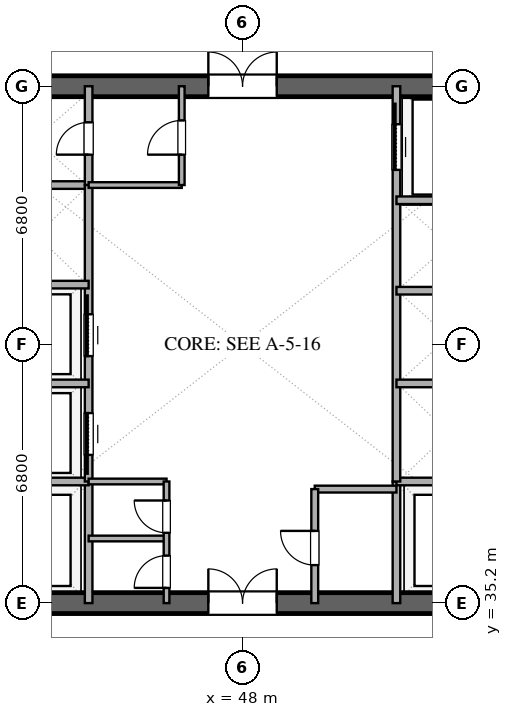
"""IFC4 building model, lengths in metres.
Left out: names, types, materials, properties, quantities, classifications, styles, units other than length and angle.
Written with IfcOpenShell. Run it as: python <this file> out.ifc"""

import sys

from ifc_helpers import new_model, si_unit, direction, frame, frame_2d, origin, place, context, subcontext, project, spatial, rectangle, extrude, element, fill, save


model = new_model("IFC4")
c1 = context("Model", 3, precision=1e-05, world=origin(), true_north=direction((0.0, 1.0)))
c2 = subcontext(c1, "Body", "Model", "MODEL_VIEW")
j1 = project(units=[si_unit("LENGTHUNIT", "METRE"), si_unit("PLANEANGLEUNIT", "RADIAN")], contexts=[c1])
p1 = place(None, origin())
s1 = spatial("IfcSite", under=j1, at=p1, CompositionType="ELEMENT")
p2 = place(p1, origin())
s2 = spatial("IfcBuilding", under=s1, at=p2, CompositionType="ELEMENT")
p3 = place(p2, frame((0.0, 0.0, 87.6)))
s3 = spatial("IfcBuildingStorey", under=s2, at=p3, CompositionType="ELEMENT", Elevation=87.6)
p4 = place(p3, frame((41.0, 35.2, 0.0), z_axis=(0.0, 0.0, 1.0), x_axis=(1.0, 0.0, 0.0)))
e1 = element("IfcWall", 1, at=p4, inside=s3, PredefinedType="SHEAR", context=c2, shape_type="SweptSolid", body=[
    extrude(rectangle(XDim=14.0, YDim=0.55, at=frame_2d((7.0, 0.0))), origin(), (0.0, 0.0, 1.0), 3.38),
])
p5 = place(p4, frame((6.1, 0.0, 0.0)))
e2 = element("IfcOpeningElement", 2, at=p5, cuts=e1, PredefinedType="OPENING", context=c2, shape_type="SweptSolid", body=[
    extrude(rectangle(XDim=1.8, YDim=2.25, at=frame_2d((0.9, 1.125))), frame((0.0, 0.285, 0.0), z_axis=(0.0, -1.0, 0.0), x_axis=(1.0, 0.0, 0.0)), (0.0, 0.0, 1.0), 0.57),
])
p6 = place(p3, frame((41.0, 48.8, 0.0), z_axis=(0.0, 0.0, 1.0), x_axis=(1.0, 0.0, 0.0)))
e3 = element("IfcWall", 3, at=p6, inside=s3, PredefinedType="SHEAR", context=c2, shape_type="SweptSolid", body=[
    extrude(rectangle(XDim=14.0, YDim=0.55, at=frame_2d((7.0, 0.0))), origin(), (0.0, 0.0, 1.0), 3.38),
])
p7 = place(p6, frame((6.1, 0.0, 0.0)))
e4 = element("IfcOpeningElement", 4, at=p7, cuts=e3, PredefinedType="OPENING", context=c2, shape_type="SweptSolid", body=[
    extrude(rectangle(XDim=1.8, YDim=2.25, at=frame_2d((0.9, 1.125))), frame((0.0, 0.285, 0.0), z_axis=(0.0, -1.0, 0.0), x_axis=(1.0, 0.0, 0.0)), (0.0, 0.0, 1.0), 0.57),
])
p8 = place(p3, frame((43.95, 35.2, 0.0), z_axis=(0.0, 0.0, 1.0), x_axis=(0.0, 1.0, 0.0)))
e5 = element("IfcWall", 5, at=p8, inside=s3, PredefinedType="SOLIDWALL", context=c2, shape_type="SweptSolid", body=[
    extrude(rectangle(XDim=3.2, YDim=0.2, at=frame_2d((1.6, 0.0))), origin(), (0.0, 0.0, 1.0), 2.74),
])
p9 = place(p3, frame((41.0, 38.4, 0.0), z_axis=(0.0, 0.0, 1.0), x_axis=(1.0, 0.0, 0.0)))
e6 = element("IfcWall", 6, at=p9, inside=s3, PredefinedType="SOLIDWALL", context=c2, shape_type="SweptSolid", body=[
    extrude(rectangle(XDim=2.95, YDim=0.2, at=frame_2d((1.475, 0.0))), origin(), (0.0, 0.0, 1.0), 2.74),
])
p10 = place(p3, frame((52.05, 35.2, 0.0), z_axis=(0.0, 0.0, 1.0), x_axis=(0.0, 1.0, 0.0)))
e7 = element("IfcWall", 7, at=p10, inside=s3, PredefinedType="SOLIDWALL", context=c2, shape_type="SweptSolid", body=[
    extrude(rectangle(XDim=3.2, YDim=0.2, at=frame_2d((1.6, 0.0))), origin(), (0.0, 0.0, 1.0), 2.74),
])
for number, where, z_axis, x_axis in (
    (8, (52.05, 38.4, 0.0), (0.0, 0.0, 1.0), (1.0, 0.0, 0.0)),
    (9, (41.0, 46.2, 0.0), (0.0, 0.0, 1.0), (1.0, 0.0, 0.0)),
):
    element("IfcWall", number, at=place(p3, frame(where, z_axis=z_axis, x_axis=x_axis)), inside=s3, PredefinedType="SOLIDWALL", context=c2, shape_type="SweptSolid", body=[
        extrude(rectangle(XDim=2.95, YDim=0.2, at=frame_2d((1.475, 0.0))), origin(), (0.0, 0.0, 1.0), 2.74),
    ])
p11 = place(p3, frame((43.95, 46.2, 0.0), z_axis=(0.0, 0.0, 1.0), x_axis=(0.0, 1.0, 0.0)))
e10 = element("IfcWall", 10, at=p11, inside=s3, PredefinedType="SOLIDWALL", context=c2, shape_type="SweptSolid", body=[
    extrude(rectangle(XDim=2.6, YDim=0.2, at=frame_2d((1.3, 0.0))), origin(), (0.0, 0.0, 1.0), 2.74),
])
p12 = place(p11, frame((0.8, 0.0, 0.0)))
e11 = element("IfcOpeningElement", 11, at=p12, cuts=e10, PredefinedType="OPENING", context=c2, shape_type="SweptSolid", body=[
    extrude(rectangle(XDim=0.85, YDim=2.15, at=frame_2d((0.425, 1.075))), frame((0.0, 0.11, 0.0), z_axis=(0.0, -1.0, 0.0), x_axis=(1.0, 0.0, 0.0)), (0.0, 0.0, 1.0), 0.22),
])
p13 = place(p3, frame((43.95, 38.4, 0.0), z_axis=(0.0, 0.0, 1.0), x_axis=(0.0, 1.0, 0.0)))
e12 = element("IfcWall", 12, at=p13, inside=s3, PredefinedType="SOLIDWALL", context=c2, shape_type="SweptSolid", body=[
    extrude(rectangle(XDim=7.8, YDim=0.2, at=frame_2d((3.9, 0.0))), origin(), (0.0, 0.0, 1.0), 2.74),
])
p14 = place(p13, frame((0.7, 0.0, 0.0)))
e13 = element("IfcOpeningElement", 13, at=p14, cuts=e12, PredefinedType="OPENING", context=c2, shape_type="SweptSolid", body=[
    extrude(rectangle(XDim=1.1, YDim=2.2, at=frame_2d((0.55, 1.1))), frame((0.0, 0.11, 0.0), z_axis=(0.0, -1.0, 0.0), x_axis=(1.0, 0.0, 0.0)), (0.0, 0.0, 1.0), 0.22),
])
p15 = place(p13, frame((3.3, 0.0, 0.0)))
e14 = element("IfcOpeningElement", 14, at=p15, cuts=e12, PredefinedType="OPENING", context=c2, shape_type="SweptSolid", body=[
    extrude(rectangle(XDim=1.1, YDim=2.2, at=frame_2d((0.55, 1.1))), frame((0.0, 0.11, 0.0), z_axis=(0.0, -1.0, 0.0), x_axis=(1.0, 0.0, 0.0)), (0.0, 0.0, 1.0), 0.22),
])
for number, where, z_axis, x_axis in (
    (15, (41.0, 40.98, 0.0), (0.0, 0.0, 1.0), (1.0, 0.0, 0.0)),
    (16, (41.0, 43.58, 0.0), (0.0, 0.0, 1.0), (1.0, 0.0, 0.0)),
):
    element("IfcWall", number, at=place(p3, frame(where, z_axis=z_axis, x_axis=x_axis)), inside=s3, PredefinedType="SOLIDWALL", context=c2, shape_type="SweptSolid", body=[
        extrude(rectangle(XDim=2.95, YDim=0.2, at=frame_2d((1.475, 0.0))), origin(), (0.0, 0.0, 1.0), 2.74),
    ])
p16 = place(p3, frame((52.05, 38.4, 0.0), z_axis=(0.0, 0.0, 1.0), x_axis=(0.0, 1.0, 0.0)))
e17 = element("IfcWall", 17, at=p16, inside=s3, PredefinedType="SOLIDWALL", context=c2, shape_type="SweptSolid", body=[
    extrude(rectangle(XDim=10.4, YDim=0.2, at=frame_2d((5.2, 0.0))), origin(), (0.0, 0.0, 1.0), 2.74),
])
p17 = place(p16, frame((8.2, 0.0, 0.0)))
e18 = element("IfcOpeningElement", 18, at=p17, cuts=e17, PredefinedType="OPENING", context=c2, shape_type="SweptSolid", body=[
    extrude(rectangle(XDim=1.2, YDim=2.2, at=frame_2d((0.6, 1.1))), frame((0.0, 0.11, 0.0), z_axis=(0.0, -1.0, 0.0), x_axis=(1.0, 0.0, 0.0)), (0.0, 0.0, 1.0), 0.22),
])
for number, where, z_axis, x_axis in (
    (19, (52.05, 40.98, 0.0), (0.0, 0.0, 1.0), (1.0, 0.0, 0.0)),
    (20, (52.05, 43.42, 0.0), (0.0, 0.0, 1.0), (1.0, 0.0, 0.0)),
    (21, (52.05, 45.8, 0.0), (0.0, 0.0, 1.0), (1.0, 0.0, 0.0)),
):
    element("IfcWall", number, at=place(p3, frame(where, z_axis=z_axis, x_axis=x_axis)), inside=s3, PredefinedType="SOLIDWALL", context=c2, shape_type="SweptSolid", body=[
        extrude(rectangle(XDim=2.95, YDim=0.2, at=frame_2d((1.475, 0.0))), origin(), (0.0, 0.0, 1.0), 2.74),
    ])
for number, where, z_axis, x_axis in (
    (22, (43.95, 36.9, 0.0), (0.0, 0.0, 1.0), (1.0, 0.0, 0.0)),
    (23, (43.95, 38.4, 0.0), (0.0, 0.0, 1.0), (1.0, 0.0, 0.0)),
):
    element("IfcWall", number, at=place(p3, frame(where, z_axis=z_axis, x_axis=x_axis)), inside=s3, PredefinedType="PARTITIONING", context=c2, shape_type="SweptSolid", body=[
        extrude(rectangle(XDim=2.05, YDim=0.15, at=frame_2d((1.025, 0.0))), origin(), (0.0, 0.0, 1.0), 2.74),
    ])
p18 = place(p3, frame((46.0, 35.2, 0.0), z_axis=(0.0, 0.0, 1.0), x_axis=(0.0, 1.0, 0.0)))
e24 = element("IfcWall", 24, at=p18, inside=s3, PredefinedType="PARTITIONING", context=c2, shape_type="SweptSolid", body=[
    extrude(rectangle(XDim=3.2, YDim=0.15, at=frame_2d((1.6, 0.0))), origin(), (0.0, 0.0, 1.0), 2.74),
])
p19 = place(p18, frame((0.4, 0.0, 0.0)))
e25 = element("IfcOpeningElement", 25, at=p19, cuts=e24, PredefinedType="OPENING", context=c2, shape_type="SweptSolid", body=[
    extrude(rectangle(XDim=0.85, YDim=2.15, at=frame_2d((0.425, 1.075))), frame((0.0, 0.085, 0.0), z_axis=(0.0, -1.0, 0.0), x_axis=(1.0, 0.0, 0.0)), (0.0, 0.0, 1.0), 0.17),
])
p20 = place(p18, frame((1.85, 0.0, 0.0)))
e26 = element("IfcOpeningElement", 26, at=p20, cuts=e24, PredefinedType="OPENING", context=c2, shape_type="SweptSolid", body=[
    extrude(rectangle(XDim=0.85, YDim=2.15, at=frame_2d((0.425, 1.075))), frame((0.0, 0.085, 0.0), z_axis=(0.0, -1.0, 0.0), x_axis=(1.0, 0.0, 0.0)), (0.0, 0.0, 1.0), 0.17),
])
p21 = place(p3, frame((43.95, 46.2, 0.0), z_axis=(0.0, 0.0, 1.0), x_axis=(1.0, 0.0, 0.0)))
e27 = element("IfcWall", 27, at=p21, inside=s3, PredefinedType="PARTITIONING", context=c2, shape_type="SweptSolid", body=[
    extrude(rectangle(XDim=2.45, YDim=0.15, at=frame_2d((1.225, 0.0))), origin(), (0.0, 0.0, 1.0), 2.74),
])
p22 = place(p3, frame((46.4, 46.2, 0.0), z_axis=(0.0, 0.0, 1.0), x_axis=(0.0, 1.0, 0.0)))
e28 = element("IfcWall", 28, at=p22, inside=s3, PredefinedType="PARTITIONING", context=c2, shape_type="SweptSolid", body=[
    extrude(rectangle(XDim=2.6, YDim=0.15, at=frame_2d((1.3, 0.0))), origin(), (0.0, 0.0, 1.0), 2.74),
])
p23 = place(p22, frame((0.8, 0.0, 0.0)))
e29 = element("IfcOpeningElement", 29, at=p23, cuts=e28, PredefinedType="OPENING", context=c2, shape_type="SweptSolid", body=[
    extrude(rectangle(XDim=0.9, YDim=2.15, at=frame_2d((0.45, 1.075))), frame((0.0, 0.085, 0.0), z_axis=(0.0, -1.0, 0.0), x_axis=(1.0, 0.0, 0.0)), (0.0, 0.0, 1.0), 0.17),
])
p24 = place(p3, frame((49.9, 38.2, 0.0), z_axis=(0.0, 0.0, 1.0), x_axis=(1.0, 0.0, 0.0)))
e30 = element("IfcWall", 30, at=p24, inside=s3, PredefinedType="PLUMBINGWALL", context=c2, shape_type="SweptSolid", body=[
    extrude(rectangle(XDim=2.15, YDim=0.18, at=frame_2d((1.075, 0.0))), origin(), (0.0, 0.0, 1.0), 2.74),
])
p25 = place(p3, frame((49.9, 35.2, 0.0), z_axis=(0.0, 0.0, 1.0), x_axis=(0.0, 1.0, 0.0)))
e31 = element("IfcWall", 31, at=p25, inside=s3, PredefinedType="PLUMBINGWALL", context=c2, shape_type="SweptSolid", body=[
    extrude(rectangle(XDim=3.0, YDim=0.18, at=frame_2d((1.5, 0.0))), origin(), (0.0, 0.0, 1.0), 2.74),
])
p26 = place(p25, frame((1.0, 0.0, 0.0)))
e32 = element("IfcOpeningElement", 32, at=p26, cuts=e31, PredefinedType="OPENING", context=c2, shape_type="SweptSolid", body=[
    extrude(rectangle(XDim=0.9, YDim=2.1, at=frame_2d((0.45, 1.05))), frame((0.0, 0.1, 0.0), z_axis=(0.0, -1.0, 0.0), x_axis=(1.0, 0.0, 0.0)), (0.0, 0.0, 1.0), 0.2),
])
p27 = place(p5, origin())
e33 = element("IfcDoor", 33, at=p27, inside=s3, OperationType="DOUBLE_DOOR_SINGLE_SWING", PredefinedType="DOOR", context=c2, shape_type="SweptSolid", body=[
    extrude(rectangle(XDim=1.8, YDim=2.25, at=frame_2d((0.9, 1.125))), frame((0.0, 0.025, 0.0), z_axis=(0.0, -1.0, 0.0), x_axis=(1.0, 0.0, 0.0)), (0.0, 0.0, 1.0), 0.05),
])
fill(e2, e33)
p28 = place(p7, origin())
e34 = element("IfcDoor", 34, at=p28, inside=s3, OperationType="DOUBLE_DOOR_SINGLE_SWING", PredefinedType="DOOR", context=c2, shape_type="SweptSolid", body=[
    extrude(rectangle(XDim=1.8, YDim=2.25, at=frame_2d((0.9, 1.125))), frame((0.0, 0.025, 0.0), z_axis=(0.0, -1.0, 0.0), x_axis=(1.0, 0.0, 0.0)), (0.0, 0.0, 1.0), 0.05),
])
fill(e4, e34)
p29 = place(p12, origin())
e35 = element("IfcDoor", 35, at=p29, inside=s3, OperationType="SINGLE_SWING_LEFT", PredefinedType="DOOR", context=c2, shape_type="SweptSolid", body=[
    extrude(rectangle(XDim=0.85, YDim=2.15, at=frame_2d((0.425, 1.075))), frame((0.0, 0.025, 0.0), z_axis=(0.0, -1.0, 0.0), x_axis=(1.0, 0.0, 0.0)), (0.0, 0.0, 1.0), 0.05),
])
fill(e11, e35)
p30 = place(p14, origin())
e36 = element("IfcDoor", 36, at=p30, inside=s3, OperationType="SLIDING_TO_LEFT", PredefinedType="DOOR", context=c2, shape_type="SweptSolid", body=[
    extrude(rectangle(XDim=1.1, YDim=2.2, at=frame_2d((0.55, 1.1))), frame((0.0, 0.025, 0.0), z_axis=(0.0, -1.0, 0.0), x_axis=(1.0, 0.0, 0.0)), (0.0, 0.0, 1.0), 0.05),
])
fill(e13, e36)
p31 = place(p15, origin())
e37 = element("IfcDoor", 37, at=p31, inside=s3, OperationType="SLIDING_TO_RIGHT", PredefinedType="DOOR", context=c2, shape_type="SweptSolid", body=[
    extrude(rectangle(XDim=1.1, YDim=2.2, at=frame_2d((0.55, 1.1))), frame((0.0, 0.025, 0.0), z_axis=(0.0, -1.0, 0.0), x_axis=(1.0, 0.0, 0.0)), (0.0, 0.0, 1.0), 0.05),
])
fill(e14, e37)
p32 = place(p17, origin())
e38 = element("IfcDoor", 38, at=p32, inside=s3, OperationType="SLIDING_TO_RIGHT", PredefinedType="DOOR", context=c2, shape_type="SweptSolid", body=[
    extrude(rectangle(XDim=1.2, YDim=2.2, at=frame_2d((0.6, 1.1))), frame((0.0, 0.025, 0.0), z_axis=(0.0, -1.0, 0.0), x_axis=(1.0, 0.0, 0.0)), (0.0, 0.0, 1.0), 0.05),
])
fill(e18, e38)
p33 = place(p19, origin())
e39 = element("IfcDoor", 39, at=p33, inside=s3, OperationType="SINGLE_SWING_LEFT", PredefinedType="DOOR", context=c2, shape_type="SweptSolid", body=[
    extrude(rectangle(XDim=0.85, YDim=2.15, at=frame_2d((0.425, 1.075))), frame((0.0, 0.025, 0.0), z_axis=(0.0, -1.0, 0.0), x_axis=(1.0, 0.0, 0.0)), (0.0, 0.0, 1.0), 0.05),
])
fill(e25, e39)
p34 = place(p20, origin())
e40 = element("IfcDoor", 40, at=p34, inside=s3, OperationType="SINGLE_SWING_RIGHT", PredefinedType="DOOR", context=c2, shape_type="SweptSolid", body=[
    extrude(rectangle(XDim=0.85, YDim=2.15, at=frame_2d((0.425, 1.075))), frame((0.0, 0.025, 0.0), z_axis=(0.0, -1.0, 0.0), x_axis=(1.0, 0.0, 0.0)), (0.0, 0.0, 1.0), 0.05),
])
fill(e26, e40)
p35 = place(p23, origin())
e41 = element("IfcDoor", 41, at=p35, inside=s3, OperationType="SINGLE_SWING_LEFT", PredefinedType="DOOR", context=c2, shape_type="SweptSolid", body=[
    extrude(rectangle(XDim=0.9, YDim=2.15, at=frame_2d((0.45, 1.075))), frame((0.0, 0.025, 0.0), z_axis=(0.0, -1.0, 0.0), x_axis=(1.0, 0.0, 0.0)), (0.0, 0.0, 1.0), 0.05),
])
fill(e29, e41)
p36 = place(p26, origin())
e42 = element("IfcDoor", 42, at=p36, inside=s3, OperationType="SINGLE_SWING_RIGHT", PredefinedType="DOOR", context=c2, shape_type="SweptSolid", body=[
    extrude(rectangle(XDim=0.9, YDim=2.1, at=frame_2d((0.45, 1.05))), frame((0.0, 0.025, 0.0), z_axis=(0.0, -1.0, 0.0), x_axis=(1.0, 0.0, 0.0)), (0.0, 0.0, 1.0), 0.05),
])
fill(e32, e42)
save(model, sys.argv[1])
